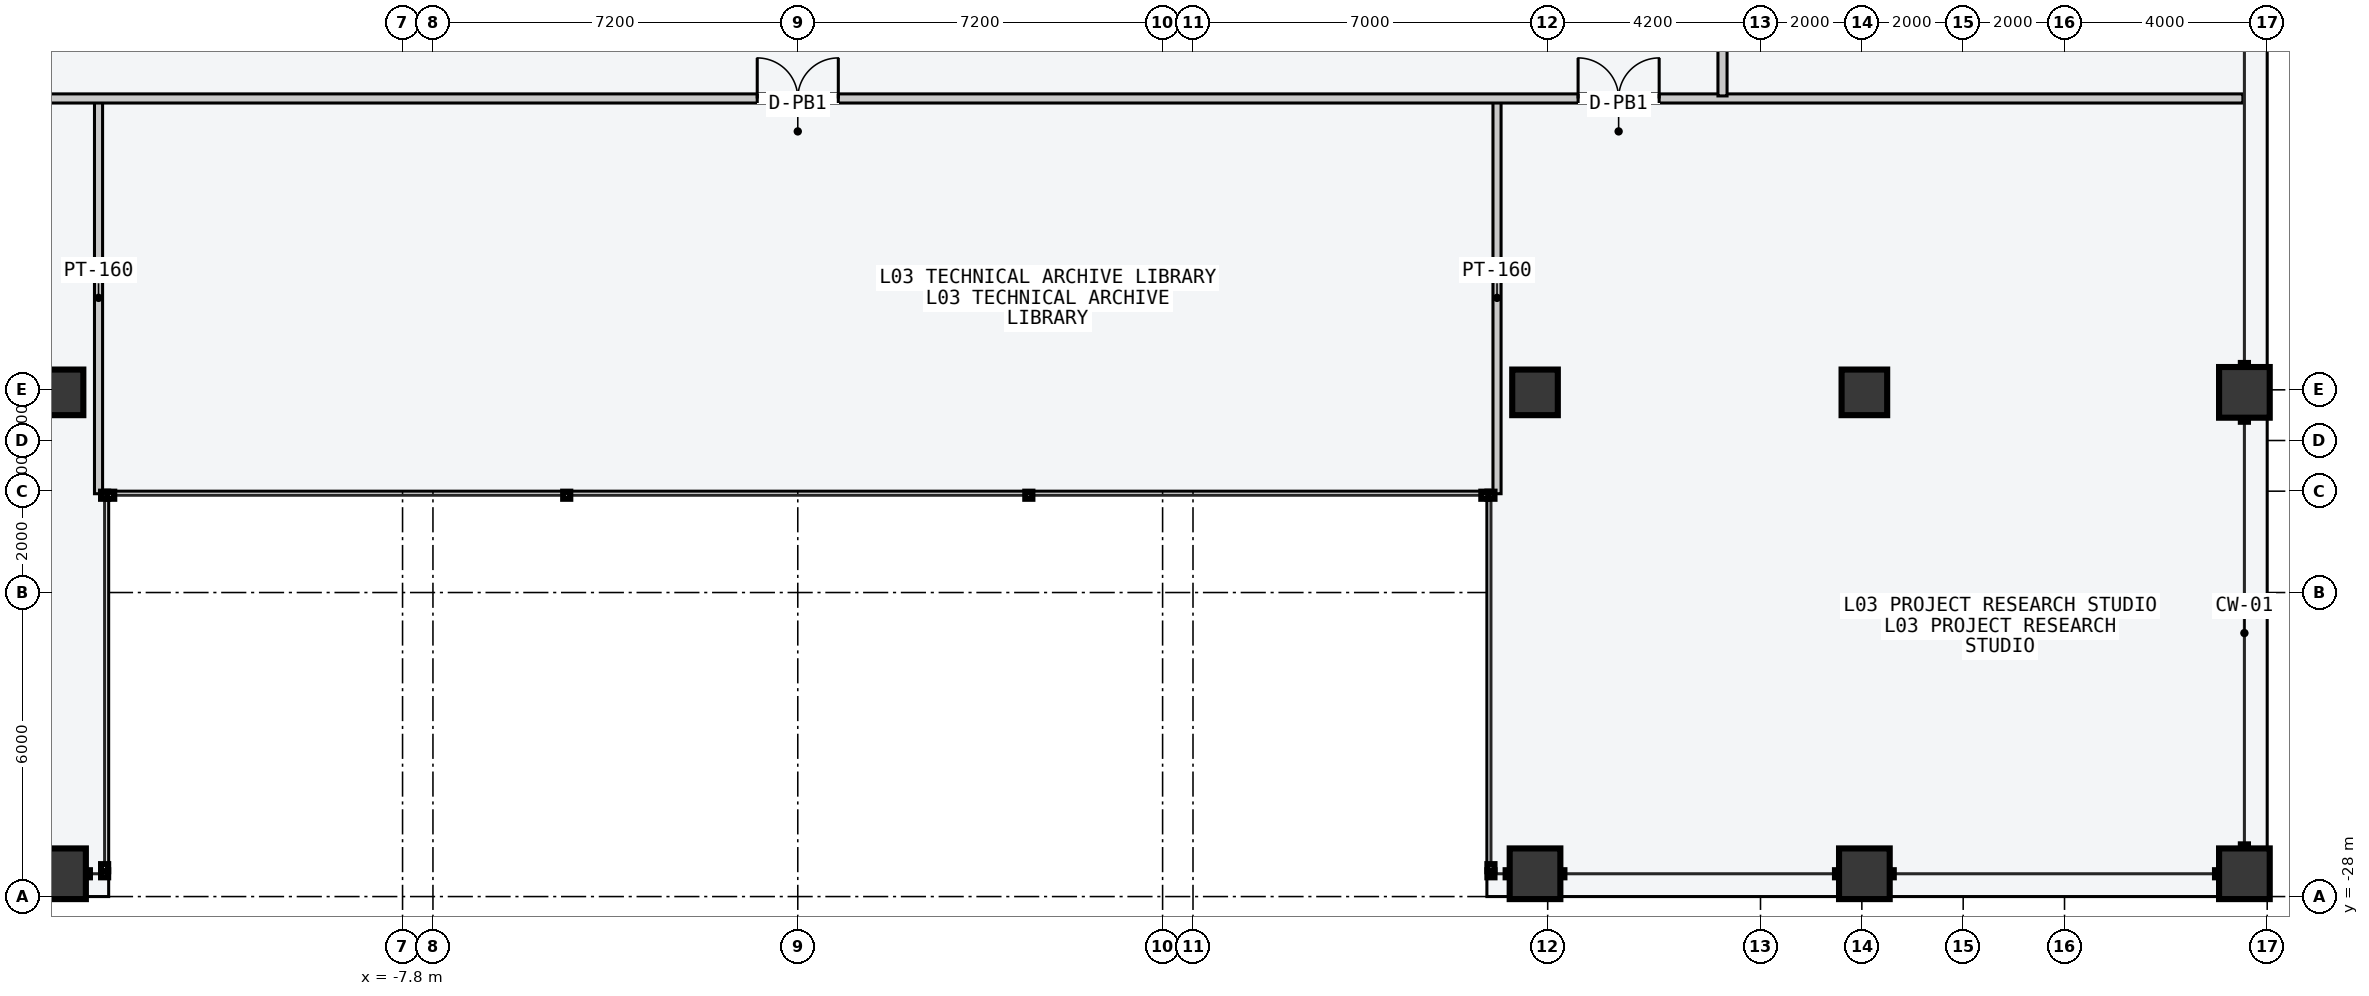
"""IFC4 building model, lengths in metres.
Left out: names, types, materials, properties, quantities, classifications, styles, units other than length and angle.
Written with IfcOpenShell. Run it as: python <this file> out.ifc"""

import sys

from ifc_helpers import new_model, si_unit, direction, frame, frame_2d, origin, origin_2d, place, context, subcontext, project, spatial, rectangle, hollow_rectangle, extrude, element, fill, save


model = new_model("IFC4")
c1 = context("Model", 3, precision=1e-05, world=origin(), true_north=direction((0.0, 1.0)))
c2 = subcontext(c1, "Body", "Model", "MODEL_VIEW")
j1 = project(units=[si_unit("LENGTHUNIT", "METRE"), si_unit("PLANEANGLEUNIT", "RADIAN")], contexts=[c1])
p1 = place(None, origin())
s1 = spatial("IfcSite", under=j1, at=p1, CompositionType="ELEMENT")
p2 = place(p1, origin())
s2 = spatial("IfcBuilding", under=s1, at=p2, CompositionType="ELEMENT")
p3 = place(p2, frame((0.0, 0.0, 14.4)))
s3 = spatial("IfcBuildingStorey", under=s2, at=p3, CompositionType="ELEMENT", Elevation=14.4)
for number, where, z_axis, x_axis in (
    (1, (-14.55, -18.05, 0.0), (0.0, 0.0, 1.0), (1.0, 0.0, 0.0)),
    (2, (14.55, -18.05, 0.0), (0.0, 0.0, 1.0), (1.0, 0.0, 0.0)),
    (3, (21.05, -18.05, 0.0), (0.0, 0.0, 1.0), (1.0, 0.0, 0.0)),
):
    element("IfcColumn", number, at=place(p3, frame(where, z_axis=z_axis, x_axis=x_axis)), inside=s3, PredefinedType="COLUMN", context=c2, shape_type="SweptSolid", body=[
        extrude(hollow_rectangle(XDim=0.9, YDim=0.9, WallThickness=0.045, at=origin_2d()), origin(), (0.0, 0.0, 1.0), 4.8),
    ])
for number, where, z_axis, x_axis in (
    (4, (-14.55, -27.55, 0.0), (0.0, 0.0, 1.0), (1.0, 0.0, 0.0)),
    (5, (14.55, -27.55, 0.0), (0.0, 0.0, 1.0), (1.0, 0.0, 0.0)),
    (6, (21.05, -27.55, 0.0), (0.0, 0.0, 1.0), (1.0, 0.0, 0.0)),
    (7, (28.55, -27.55, 0.0), (0.0, 0.0, 1.0), (1.0, 0.0, 0.0)),
    (8, (28.55, -18.05, 0.0), (0.0, 0.0, 1.0), (0.0, 1.0, 0.0)),
):
    element("IfcColumn", number, at=place(p3, frame(where, z_axis=z_axis, x_axis=x_axis)), inside=s3, PredefinedType="COLUMN", context=c2, shape_type="SweptSolid", body=[
        extrude(hollow_rectangle(XDim=1.0, YDim=1.0, WallThickness=0.05, at=origin_2d()), origin(), (0.0, 0.0, 1.0), 4.8),
    ])
for number, where, z_axis, x_axis in (
    (9, (-13.8, -20.05, 0.0), (0.0, 0.0, 1.0), (0.0, 1.0, 0.0)),
    (10, (13.8, -20.05, 0.0), (0.0, 0.0, 1.0), (0.0, 1.0, 0.0)),
):
    element("IfcWall", number, at=place(p3, frame(where, z_axis=z_axis, x_axis=x_axis)), inside=s3, PredefinedType="PARTITIONING", context=c2, shape_type="SweptSolid", body=[
        extrude(rectangle(XDim=7.73, YDim=0.16, at=frame_2d((3.865, 0.0))), origin(), (0.0, 0.0, 1.0), 4.58),
    ])
p4 = place(p3, frame((-28.52, -12.25, 0.0), z_axis=(0.0, 0.0, 1.0), x_axis=(1.0, 0.0, 0.0)))
e11 = element("IfcWall", 11, at=p4, inside=s3, PredefinedType="PARTITIONING", context=c2, shape_type="SweptSolid", body=[
    extrude(rectangle(XDim=57.04, YDim=0.18, at=frame_2d((28.52, 0.0))), origin(), (0.0, 0.0, 1.0), 4.58),
])
p5 = place(p4, frame((11.52, 0.0, 0.0)))
e12 = element("IfcOpeningElement", 12, at=p5, cuts=e11, PredefinedType="OPENING", context=c2, shape_type="SweptSolid", body=[
    extrude(rectangle(XDim=1.6, YDim=2.3, at=frame_2d((0.8, 1.15))), frame((0.0, 0.1, 0.0), z_axis=(0.0, -1.0, 0.0), x_axis=(1.0, 0.0, 0.0)), (0.0, 0.0, 1.0), 0.2),
])
p6 = place(p4, frame((27.72, 0.0, 0.0)))
e13 = element("IfcOpeningElement", 13, at=p6, cuts=e11, PredefinedType="OPENING", context=c2, shape_type="SweptSolid", body=[
    extrude(rectangle(XDim=1.6, YDim=2.3, at=frame_2d((0.8, 1.15))), frame((0.0, 0.1, 0.0), z_axis=(0.0, -1.0, 0.0), x_axis=(1.0, 0.0, 0.0)), (0.0, 0.0, 1.0), 0.2),
])
p7 = place(p4, frame((43.92, 0.0, 0.0)))
e14 = element("IfcOpeningElement", 14, at=p7, cuts=e11, PredefinedType="OPENING", context=c2, shape_type="SweptSolid", body=[
    extrude(rectangle(XDim=1.6, YDim=2.3, at=frame_2d((0.8, 1.15))), frame((0.0, 0.1, 0.0), z_axis=(0.0, -1.0, 0.0), x_axis=(1.0, 0.0, 0.0)), (0.0, 0.0, 1.0), 0.2),
])
p8 = place(p3, frame((18.25, -12.2, 0.0), z_axis=(0.0, 0.0, 1.0), x_axis=(0.0, 1.0, 0.0)))
e15 = element("IfcWall", 15, at=p8, inside=s3, PredefinedType="PARTITIONING", context=c2, shape_type="SweptSolid", body=[
    extrude(rectangle(XDim=28.9, YDim=0.18, at=frame_2d((14.45, 0.0))), origin(), (0.0, 0.0, 1.0), 4.58),
])
p9 = place(p8, frame((13.0, 0.0, 0.0)))
e16 = element("IfcOpeningElement", 16, at=p9, cuts=e15, PredefinedType="OPENING", context=c2, shape_type="SweptSolid", body=[
    extrude(rectangle(XDim=1.6, YDim=2.3, at=frame_2d((0.8, 1.15))), frame((0.0, 0.1, 0.0), z_axis=(0.0, -1.0, 0.0), x_axis=(1.0, 0.0, 0.0)), (0.0, 0.0, 1.0), 0.2),
])
p10 = place(p6, origin())
e17 = element("IfcDoor", 17, at=p10, inside=s3, OperationType="DOUBLE_DOOR_SINGLE_SWING", PredefinedType="DOOR", context=c2, shape_type="SweptSolid", body=[
    extrude(rectangle(XDim=1.6, YDim=2.3, at=frame_2d((0.8, 1.15))), frame((0.0, 0.025, 0.0), z_axis=(0.0, -1.0, 0.0), x_axis=(1.0, 0.0, 0.0)), (0.0, 0.0, 1.0), 0.05),
])
fill(e13, e17)
p11 = place(p7, origin())
e18 = element("IfcDoor", 18, at=p11, inside=s3, OperationType="DOUBLE_DOOR_SINGLE_SWING", PredefinedType="DOOR", context=c2, shape_type="SweptSolid", body=[
    extrude(rectangle(XDim=1.6, YDim=2.3, at=frame_2d((0.8, 1.15))), frame((0.0, 0.025, 0.0), z_axis=(0.0, -1.0, 0.0), x_axis=(1.0, 0.0, 0.0)), (0.0, 0.0, 1.0), 0.05),
])
fill(e14, e18)
save(model, sys.argv[1])
